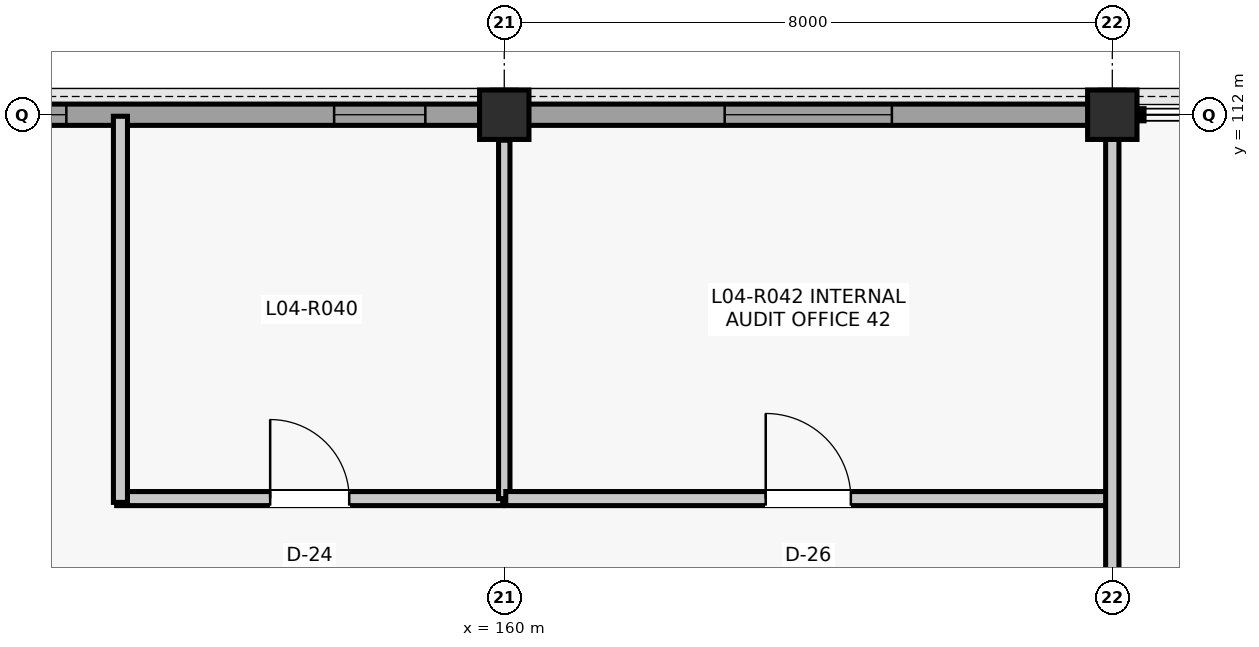
"""IFC4 building model, lengths in metres.
Left out: names, types, materials, properties, quantities, classifications, styles, units other than length and angle.
Written with IfcOpenShell. Run it as: python <this file> out.ifc"""

import sys

from ifc_helpers import new_model, si_unit, direction, frame, frame_2d, origin, origin_2d, place, context, subcontext, project, spatial, rectangle, extrude, element, fill, save


model = new_model("IFC4")
c1 = context("Model", 3, precision=1e-05, world=origin(), true_north=direction((0.0, 1.0)))
c2 = subcontext(c1, "Body", "Model", "MODEL_VIEW")
j1 = project(units=[si_unit("LENGTHUNIT", "METRE"), si_unit("PLANEANGLEUNIT", "RADIAN")], contexts=[c1])
p1 = place(None, origin())
s1 = spatial("IfcSite", under=j1, at=p1, CompositionType="ELEMENT")
p2 = place(p1, origin())
s2 = spatial("IfcBuilding", under=s1, at=p2, CompositionType="ELEMENT")
p3 = place(p2, frame((0.0, 0.0, 17.82)))
s3 = spatial("IfcBuildingStorey", under=s2, at=p3, CompositionType="ELEMENT", Elevation=17.82)
for number, where, z_axis, x_axis in (
    (1, (160.0, 112.0, 0.0), (0.0, 0.0, 1.0), (1.0, 0.0, 0.0)),
    (2, (168.0, 112.0, 0.0), (0.0, 0.0, 1.0), (1.0, 0.0, 0.0)),
):
    element("IfcColumn", number, at=place(p3, frame(where, z_axis=z_axis, x_axis=x_axis)), inside=s3, PredefinedType="COLUMN", context=c2, shape_type="SweptSolid", body=[
        extrude(rectangle(XDim=0.65, YDim=0.65, at=origin_2d()), origin(), (0.0, 0.0, 1.0), 3.96),
    ])
p4 = place(p3, frame((152.31, 112.0, 0.0), z_axis=(0.0, 0.0, 1.0), x_axis=(1.0, 0.0, 0.0)))
e3 = element("IfcWall", 3, at=p4, inside=s3, PredefinedType="SOLIDWALL", context=c2, shape_type="SweptSolid", body=[
    extrude(rectangle(XDim=7.38, YDim=0.28, at=frame_2d((3.69, 0.0))), origin(), (0.0, 0.0, 1.0), 3.349),
])
p5 = place(p4, frame((0.729, 0.0, 0.95)))
e4 = element("IfcOpeningElement", 4, at=p5, cuts=e3, PredefinedType="OPENING", context=c2, shape_type="SweptSolid", body=[
    extrude(rectangle(XDim=1.2, YDim=1.8, at=frame_2d((0.6, 0.9))), frame((0.0, 0.15, 0.0), z_axis=(0.0, -1.0, 0.0), x_axis=(1.0, 0.0, 0.0)), (0.0, 0.0, 1.0), 0.3),
])
p6 = place(p4, frame((5.452, 0.0, 0.95)))
e5 = element("IfcOpeningElement", 5, at=p6, cuts=e3, PredefinedType="OPENING", context=c2, shape_type="SweptSolid", body=[
    extrude(rectangle(XDim=1.2, YDim=1.8, at=frame_2d((0.6, 0.9))), frame((0.0, 0.15, 0.0), z_axis=(0.0, -1.0, 0.0), x_axis=(1.0, 0.0, 0.0)), (0.0, 0.0, 1.0), 0.3),
])
p7 = place(p3, frame((160.31, 112.0, 0.0), z_axis=(0.0, 0.0, 1.0), x_axis=(1.0, 0.0, 0.0)))
e6 = element("IfcWall", 6, at=p7, inside=s3, PredefinedType="SOLIDWALL", context=c2, shape_type="SweptSolid", body=[
    extrude(rectangle(XDim=7.38, YDim=0.28, at=frame_2d((3.69, 0.0))), origin(), (0.0, 0.0, 1.0), 3.314),
])
p8 = place(p7, frame((2.59, 0.0, 0.9)))
e7 = element("IfcOpeningElement", 7, at=p8, cuts=e6, PredefinedType="OPENING", context=c2, shape_type="SweptSolid", body=[
    extrude(rectangle(XDim=2.2, YDim=2.0, at=frame_2d((1.1, 1.0))), frame((0.0, 0.15, 0.0), z_axis=(0.0, -1.0, 0.0), x_axis=(1.0, 0.0, 0.0)), (0.0, 0.0, 1.0), 0.3),
])
p9 = place(p3, frame((154.9, 106.95, 0.0), z_axis=(0.0, 0.0, 1.0), x_axis=(1.0, 0.0, 0.0)))
e8 = element("IfcWall", 8, at=p9, inside=s3, PredefinedType="PARTITIONING", context=c2, shape_type="SweptSolid", body=[
    extrude(rectangle(XDim=5.08, YDim=0.185, at=frame_2d((2.54, 0.0))), origin(), (0.0, 0.0, 1.0), 3.232),
])
p10 = place(p9, frame((2.02, 0.0, 0.0)))
e9 = element("IfcOpeningElement", 9, at=p10, cuts=e8, PredefinedType="OPENING", context=c2, shape_type="SweptSolid", body=[
    extrude(rectangle(XDim=1.04, YDim=2.18, at=frame_2d((0.52, 1.09))), frame((0.0, 0.103, 0.0), z_axis=(0.0, -1.0, 0.0), x_axis=(1.0, 0.0, 0.0)), (0.0, 0.0, 1.0), 0.205),
])
p11 = place(p3, frame((154.95, 106.9, 0.0), z_axis=(0.0, 0.0, 1.0), x_axis=(0.0, 1.0, 0.0)))
e10 = element("IfcWall", 10, at=p11, inside=s3, PredefinedType="PARTITIONING", context=c2, shape_type="SweptSolid", body=[
    extrude(rectangle(XDim=5.08, YDim=0.185, at=frame_2d((2.54, 0.0))), origin(), (0.0, 0.0, 1.0), 3.342),
])
p12 = place(p3, frame((160.0, 106.95, 0.0), z_axis=(0.0, 0.0, 1.0), x_axis=(0.0, 1.0, 0.0)))
e11 = element("IfcWall", 11, at=p12, inside=s3, PredefinedType="PARTITIONING", context=c2, shape_type="SweptSolid", body=[
    extrude(rectangle(XDim=4.715, YDim=0.15, at=frame_2d((2.357, 0.0))), origin(), (0.0, 0.0, 1.0), 3.232),
])
p13 = place(p3, frame((160.02, 106.95, 0.0), z_axis=(0.0, 0.0, 1.0), x_axis=(1.0, 0.0, 0.0)))
e12 = element("IfcWall", 12, at=p13, inside=s3, PredefinedType="PARTITIONING", context=c2, shape_type="SweptSolid", body=[
    extrude(rectangle(XDim=7.96, YDim=0.185, at=frame_2d((3.98, 0.0))), origin(), (0.0, 0.0, 1.0), 3.232),
])
p14 = place(p13, frame((3.42, 0.0, 0.0)))
e13 = element("IfcOpeningElement", 13, at=p14, cuts=e12, PredefinedType="OPENING", context=c2, shape_type="SweptSolid", body=[
    extrude(rectangle(XDim=1.12, YDim=2.22, at=frame_2d((0.56, 1.11))), frame((0.0, 0.103, 0.0), z_axis=(0.0, -1.0, 0.0), x_axis=(1.0, 0.0, 0.0)), (0.0, 0.0, 1.0), 0.205),
])
p15 = place(p3, frame((168.0, 104.315, 0.0), z_axis=(0.0, 0.0, 1.0), x_axis=(0.0, 1.0, 0.0)))
e14 = element("IfcWall", 14, at=p15, inside=s3, PredefinedType="PARTITIONING", context=c2, shape_type="SweptSolid", body=[
    extrude(rectangle(XDim=7.37, YDim=0.175, at=frame_2d((3.685, 0.0))), origin(), (0.0, 0.0, 1.0), 3.263),
])
p16 = place(p15, frame((0.52, 0.0, 0.0)))
e15 = element("IfcOpeningElement", 15, at=p16, cuts=e14, PredefinedType="OPENING", context=c2, shape_type="SweptSolid", body=[
    extrude(rectangle(XDim=0.94, YDim=2.12, at=frame_2d((0.47, 1.06))), frame((0.0, 0.097, 0.0), z_axis=(0.0, -1.0, 0.0), x_axis=(1.0, 0.0, 0.0)), (0.0, 0.0, 1.0), 0.195),
])
p17 = place(p5, origin())
e16 = element("IfcWindow", 16, at=p17, inside=s3, PartitioningType="SINGLE_PANEL", PredefinedType="WINDOW", context=c2, shape_type="SweptSolid", body=[
    extrude(rectangle(XDim=1.2, YDim=1.8, at=frame_2d((0.6, 0.9))), frame((0.0, 0.03, 0.0), z_axis=(0.0, -1.0, 0.0), x_axis=(1.0, 0.0, 0.0)), (0.0, 0.0, 1.0), 0.06),
])
fill(e4, e16)
p18 = place(p6, origin())
e17 = element("IfcWindow", 17, at=p18, inside=s3, PartitioningType="SINGLE_PANEL", PredefinedType="WINDOW", context=c2, shape_type="SweptSolid", body=[
    extrude(rectangle(XDim=1.2, YDim=1.8, at=frame_2d((0.6, 0.9))), frame((0.0, 0.03, 0.0), z_axis=(0.0, -1.0, 0.0), x_axis=(1.0, 0.0, 0.0)), (0.0, 0.0, 1.0), 0.06),
])
fill(e5, e17)
p19 = place(p8, origin())
e18 = element("IfcWindow", 18, at=p19, inside=s3, PartitioningType="SINGLE_PANEL", PredefinedType="WINDOW", context=c2, shape_type="SweptSolid", body=[
    extrude(rectangle(XDim=2.2, YDim=2.0, at=frame_2d((1.1, 1.0))), frame((0.0, 0.03, 0.0), z_axis=(0.0, -1.0, 0.0), x_axis=(1.0, 0.0, 0.0)), (0.0, 0.0, 1.0), 0.06),
])
fill(e7, e18)
p20 = place(p10, origin())
e19 = element("IfcDoor", 19, at=p20, inside=s3, OperationType="SINGLE_SWING_LEFT", PredefinedType="DOOR", context=c2, shape_type="SweptSolid", body=[
    extrude(rectangle(XDim=1.04, YDim=2.18, at=frame_2d((0.52, 1.09))), frame((0.0, 0.025, 0.0), z_axis=(0.0, -1.0, 0.0), x_axis=(1.0, 0.0, 0.0)), (0.0, 0.0, 1.0), 0.05),
])
fill(e9, e19)
p21 = place(p14, origin())
e20 = element("IfcDoor", 20, at=p21, inside=s3, OperationType="SINGLE_SWING_LEFT", PredefinedType="DOOR", context=c2, shape_type="SweptSolid", body=[
    extrude(rectangle(XDim=1.12, YDim=2.22, at=frame_2d((0.56, 1.11))), frame((0.0, 0.025, 0.0), z_axis=(0.0, -1.0, 0.0), x_axis=(1.0, 0.0, 0.0)), (0.0, 0.0, 1.0), 0.05),
])
fill(e13, e20)
save(model, sys.argv[1])
